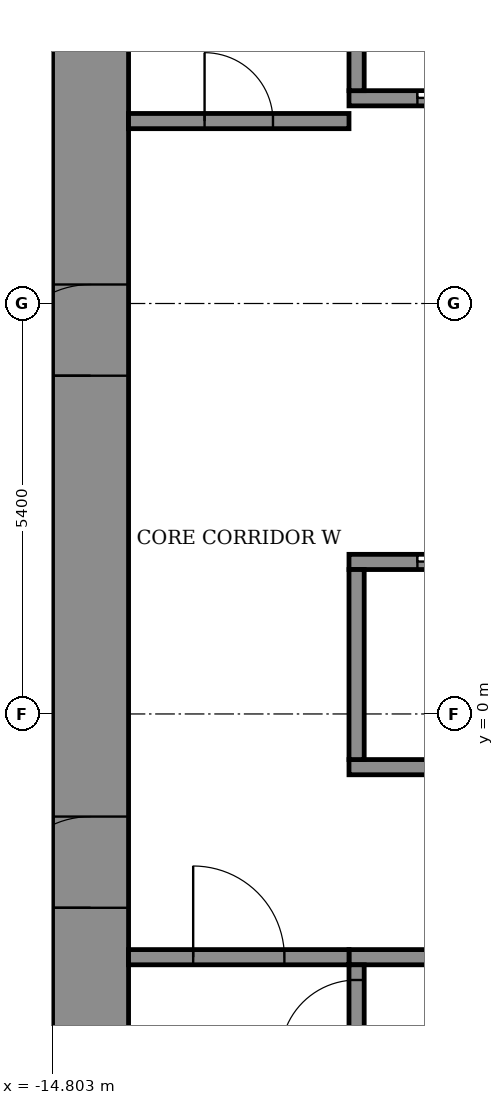
"""IFC4 building model, lengths in metres.
Left out: names, types, materials, properties, quantities, classifications, styles, units other than length and angle.
Written with IfcOpenShell. Run it as: python <this file> out.ifc"""

import sys

from ifc_helpers import new_model, si_unit, direction, frame, frame_2d, origin, place, context, subcontext, project, spatial, rectangle, extrude, element, fill, save


model = new_model("IFC4")
c1 = context("Model", 3, precision=1e-05, world=origin(), true_north=direction((0.0, 1.0)))
c2 = subcontext(c1, "Body", "Model", "MODEL_VIEW")
j1 = project(units=[si_unit("LENGTHUNIT", "METRE"), si_unit("PLANEANGLEUNIT", "RADIAN")], contexts=[c1])
p1 = place(None, origin())
s1 = spatial("IfcSite", under=j1, at=p1, CompositionType="ELEMENT")
p2 = place(p1, origin())
s2 = spatial("IfcBuilding", under=s1, at=p2, CompositionType="ELEMENT")
p3 = place(p2, frame((0.0, 0.0, 119.9)))
s3 = spatial("IfcBuildingStorey", under=s2, at=p3, CompositionType="ELEMENT", Elevation=119.9)
p4 = place(p3, frame((-14.3, -10.8, 0.0), z_axis=(0.0, 0.0, 1.0), x_axis=(0.0, 1.0, 0.0)))
e1 = element("IfcWall", 1, at=p4, inside=s3, PredefinedType="SHEAR", context=c2, shape_type="SweptSolid", body=[
    extrude(rectangle(XDim=21.6, YDim=1.0, at=frame_2d((10.8, 0.0))), origin(), (0.0, 0.0, 1.0), 5.6),
])
p5 = place(p4, frame((8.25, 0.0, 0.0)))
e2 = element("IfcOpeningElement", 2, at=p5, cuts=e1, PredefinedType="OPENING", context=c2, shape_type="SweptSolid", body=[
    extrude(rectangle(XDim=1.2, YDim=2.1, at=frame_2d((0.6, 1.05))), frame((0.0, 0.51, 0.0), z_axis=(0.0, -1.0, 0.0), x_axis=(1.0, 0.0, 0.0)), (0.0, 0.0, 1.0), 1.02),
])
p6 = place(p4, frame((15.25, 0.0, 0.0)))
e3 = element("IfcOpeningElement", 3, at=p6, cuts=e1, PredefinedType="OPENING", context=c2, shape_type="SweptSolid", body=[
    extrude(rectangle(XDim=1.2, YDim=2.1, at=frame_2d((0.6, 1.05))), frame((0.0, 0.51, 0.0), z_axis=(0.0, -1.0, 0.0), x_axis=(1.0, 0.0, 0.0)), (0.0, 0.0, 1.0), 1.02),
])
p7 = place(p4, frame((3.2, 0.0, 0.0)))
e4 = element("IfcOpeningElement", 4, at=p7, cuts=e1, PredefinedType="OPENING", context=c2, shape_type="SweptSolid", body=[
    extrude(rectangle(XDim=1.2, YDim=2.1, at=frame_2d((0.6, 1.05))), frame((0.0, 0.51, 0.0), z_axis=(0.0, -1.0, 0.0), x_axis=(1.0, 0.0, 0.0)), (0.0, 0.0, 1.0), 1.02),
])
p8 = place(p3, frame((-10.9, -3.2, 0.0), z_axis=(0.0, 0.0, 1.0), x_axis=(1.0, 0.0, 0.0)))
e5 = element("IfcWall", 5, at=p8, inside=s3, PredefinedType="SHEAR", context=c2, shape_type="SweptSolid", body=[
    extrude(rectangle(XDim=21.8, YDim=0.2, at=frame_2d((10.9, 0.0))), origin(), (0.0, 0.0, 1.0), 5.05),
])
p9 = place(p8, frame((1.075, 0.0, 0.0)))
e6 = element("IfcOpeningElement", 6, at=p9, cuts=e5, PredefinedType="OPENING", context=c2, shape_type="SweptSolid", body=[
    extrude(rectangle(XDim=1.1, YDim=2.1, at=frame_2d((0.55, 1.05))), frame((0.0, 0.11, 0.0), z_axis=(0.0, -1.0, 0.0), x_axis=(1.0, 0.0, 0.0)), (0.0, 0.0, 1.0), 0.22),
])
p10 = place(p8, frame((10.325, 0.0, 0.0)))
e7 = element("IfcOpeningElement", 7, at=p10, cuts=e5, PredefinedType="OPENING", context=c2, shape_type="SweptSolid", body=[
    extrude(rectangle(XDim=1.1, YDim=2.1, at=frame_2d((0.55, 1.05))), frame((0.0, 0.11, 0.0), z_axis=(0.0, -1.0, 0.0), x_axis=(1.0, 0.0, 0.0)), (0.0, 0.0, 1.0), 0.22),
])
p11 = place(p8, frame((19.625, 0.0, 0.0)))
e8 = element("IfcOpeningElement", 8, at=p11, cuts=e5, PredefinedType="OPENING", context=c2, shape_type="SweptSolid", body=[
    extrude(rectangle(XDim=1.1, YDim=2.1, at=frame_2d((0.55, 1.05))), frame((0.0, 0.11, 0.0), z_axis=(0.0, -1.0, 0.0), x_axis=(1.0, 0.0, 0.0)), (0.0, 0.0, 1.0), 0.22),
])
p12 = place(p8, frame((5.7, 0.0, 0.0)))
e9 = element("IfcOpeningElement", 9, at=p12, cuts=e5, PredefinedType="OPENING", context=c2, shape_type="SweptSolid", body=[
    extrude(rectangle(XDim=1.1, YDim=2.1, at=frame_2d((0.55, 1.05))), frame((0.0, 0.11, 0.0), z_axis=(0.0, -1.0, 0.0), x_axis=(1.0, 0.0, 0.0)), (0.0, 0.0, 1.0), 0.22),
])
p13 = place(p8, frame((14.975, 0.0, 0.0)))
e10 = element("IfcOpeningElement", 10, at=p13, cuts=e5, PredefinedType="OPENING", context=c2, shape_type="SweptSolid", body=[
    extrude(rectangle(XDim=1.1, YDim=2.1, at=frame_2d((0.55, 1.05))), frame((0.0, 0.11, 0.0), z_axis=(0.0, -1.0, 0.0), x_axis=(1.0, 0.0, 0.0)), (0.0, 0.0, 1.0), 0.22),
])
p14 = place(p3, frame((-10.9, -0.7, 0.0), z_axis=(0.0, 0.0, 1.0), x_axis=(1.0, 0.0, 0.0)))
e11 = element("IfcWall", 11, at=p14, inside=s3, PredefinedType="SHEAR", context=c2, shape_type="SweptSolid", body=[
    extrude(rectangle(XDim=21.8, YDim=0.2, at=frame_2d((10.9, 0.0))), origin(), (0.0, 0.0, 1.0), 5.05),
])
p15 = place(p3, frame((-10.9, 2.0, 0.0), z_axis=(0.0, 0.0, 1.0), x_axis=(1.0, 0.0, 0.0)))
e12 = element("IfcWall", 12, at=p15, inside=s3, PredefinedType="SHEAR", context=c2, shape_type="SweptSolid", body=[
    extrude(rectangle(XDim=21.8, YDim=0.2, at=frame_2d((10.9, 0.0))), origin(), (0.0, 0.0, 1.0), 5.05),
])
p16 = place(p15, frame((0.9, 0.0, 0.0)))
e13 = element("IfcOpeningElement", 13, at=p16, cuts=e12, PredefinedType="OPENING", context=c2, shape_type="SweptSolid", body=[
    extrude(rectangle(XDim=1.1, YDim=2.1, at=frame_2d((0.55, 1.05))), frame((0.0, 0.11, 0.0), z_axis=(0.0, -1.0, 0.0), x_axis=(1.0, 0.0, 0.0)), (0.0, 0.0, 1.0), 0.22),
])
p17 = place(p15, frame((3.6, 0.0, 0.0)))
e14 = element("IfcOpeningElement", 14, at=p17, cuts=e12, PredefinedType="OPENING", context=c2, shape_type="SweptSolid", body=[
    extrude(rectangle(XDim=1.1, YDim=2.1, at=frame_2d((0.55, 1.05))), frame((0.0, 0.11, 0.0), z_axis=(0.0, -1.0, 0.0), x_axis=(1.0, 0.0, 0.0)), (0.0, 0.0, 1.0), 0.22),
])
p18 = place(p15, frame((6.3, 0.0, 0.0)))
e15 = element("IfcOpeningElement", 15, at=p18, cuts=e12, PredefinedType="OPENING", context=c2, shape_type="SweptSolid", body=[
    extrude(rectangle(XDim=1.1, YDim=2.1, at=frame_2d((0.55, 1.05))), frame((0.0, 0.11, 0.0), z_axis=(0.0, -1.0, 0.0), x_axis=(1.0, 0.0, 0.0)), (0.0, 0.0, 1.0), 0.22),
])
p19 = place(p15, frame((9.0, 0.0, 0.0)))
e16 = element("IfcOpeningElement", 16, at=p19, cuts=e12, PredefinedType="OPENING", context=c2, shape_type="SweptSolid", body=[
    extrude(rectangle(XDim=1.1, YDim=2.1, at=frame_2d((0.55, 1.05))), frame((0.0, 0.11, 0.0), z_axis=(0.0, -1.0, 0.0), x_axis=(1.0, 0.0, 0.0)), (0.0, 0.0, 1.0), 0.22),
])
p20 = place(p15, frame((11.7, 0.0, 0.0)))
e17 = element("IfcOpeningElement", 17, at=p20, cuts=e12, PredefinedType="OPENING", context=c2, shape_type="SweptSolid", body=[
    extrude(rectangle(XDim=1.1, YDim=2.1, at=frame_2d((0.55, 1.05))), frame((0.0, 0.11, 0.0), z_axis=(0.0, -1.0, 0.0), x_axis=(1.0, 0.0, 0.0)), (0.0, 0.0, 1.0), 0.22),
])
p21 = place(p15, frame((14.4, 0.0, 0.0)))
e18 = element("IfcOpeningElement", 18, at=p21, cuts=e12, PredefinedType="OPENING", context=c2, shape_type="SweptSolid", body=[
    extrude(rectangle(XDim=1.1, YDim=2.1, at=frame_2d((0.55, 1.05))), frame((0.0, 0.11, 0.0), z_axis=(0.0, -1.0, 0.0), x_axis=(1.0, 0.0, 0.0)), (0.0, 0.0, 1.0), 0.22),
])
p22 = place(p15, frame((17.1, 0.0, 0.0)))
e19 = element("IfcOpeningElement", 19, at=p22, cuts=e12, PredefinedType="OPENING", context=c2, shape_type="SweptSolid", body=[
    extrude(rectangle(XDim=1.1, YDim=2.1, at=frame_2d((0.55, 1.05))), frame((0.0, 0.11, 0.0), z_axis=(0.0, -1.0, 0.0), x_axis=(1.0, 0.0, 0.0)), (0.0, 0.0, 1.0), 0.22),
])
p23 = place(p15, frame((19.8, 0.0, 0.0)))
e20 = element("IfcOpeningElement", 20, at=p23, cuts=e12, PredefinedType="OPENING", context=c2, shape_type="SweptSolid", body=[
    extrude(rectangle(XDim=1.1, YDim=2.1, at=frame_2d((0.55, 1.05))), frame((0.0, 0.11, 0.0), z_axis=(0.0, -1.0, 0.0), x_axis=(1.0, 0.0, 0.0)), (0.0, 0.0, 1.0), 0.22),
])
p24 = place(p3, frame((-10.9, 8.1, 0.0), z_axis=(0.0, 0.0, 1.0), x_axis=(1.0, 0.0, 0.0)))
e21 = element("IfcWall", 21, at=p24, inside=s3, PredefinedType="SHEAR", context=c2, shape_type="SweptSolid", body=[
    extrude(rectangle(XDim=21.8, YDim=0.2, at=frame_2d((10.9, 0.0))), origin(), (0.0, 0.0, 1.0), 5.05),
])
p25 = place(p24, frame((0.9, 0.0, 0.0)))
e22 = element("IfcOpeningElement", 22, at=p25, cuts=e21, PredefinedType="OPENING", context=c2, shape_type="SweptSolid", body=[
    extrude(rectangle(XDim=1.1, YDim=2.1, at=frame_2d((0.55, 1.05))), frame((0.0, 0.11, 0.0), z_axis=(0.0, -1.0, 0.0), x_axis=(1.0, 0.0, 0.0)), (0.0, 0.0, 1.0), 0.22),
])
p26 = place(p24, frame((3.6, 0.0, 0.0)))
e23 = element("IfcOpeningElement", 23, at=p26, cuts=e21, PredefinedType="OPENING", context=c2, shape_type="SweptSolid", body=[
    extrude(rectangle(XDim=1.1, YDim=2.1, at=frame_2d((0.55, 1.05))), frame((0.0, 0.11, 0.0), z_axis=(0.0, -1.0, 0.0), x_axis=(1.0, 0.0, 0.0)), (0.0, 0.0, 1.0), 0.22),
])
p27 = place(p24, frame((6.3, 0.0, 0.0)))
e24 = element("IfcOpeningElement", 24, at=p27, cuts=e21, PredefinedType="OPENING", context=c2, shape_type="SweptSolid", body=[
    extrude(rectangle(XDim=1.1, YDim=2.1, at=frame_2d((0.55, 1.05))), frame((0.0, 0.11, 0.0), z_axis=(0.0, -1.0, 0.0), x_axis=(1.0, 0.0, 0.0)), (0.0, 0.0, 1.0), 0.22),
])
p28 = place(p24, frame((9.0, 0.0, 0.0)))
e25 = element("IfcOpeningElement", 25, at=p28, cuts=e21, PredefinedType="OPENING", context=c2, shape_type="SweptSolid", body=[
    extrude(rectangle(XDim=1.1, YDim=2.1, at=frame_2d((0.55, 1.05))), frame((0.0, 0.11, 0.0), z_axis=(0.0, -1.0, 0.0), x_axis=(1.0, 0.0, 0.0)), (0.0, 0.0, 1.0), 0.22),
])
p29 = place(p24, frame((11.7, 0.0, 0.0)))
e26 = element("IfcOpeningElement", 26, at=p29, cuts=e21, PredefinedType="OPENING", context=c2, shape_type="SweptSolid", body=[
    extrude(rectangle(XDim=1.1, YDim=2.1, at=frame_2d((0.55, 1.05))), frame((0.0, 0.11, 0.0), z_axis=(0.0, -1.0, 0.0), x_axis=(1.0, 0.0, 0.0)), (0.0, 0.0, 1.0), 0.22),
])
p30 = place(p24, frame((14.4, 0.0, 0.0)))
e27 = element("IfcOpeningElement", 27, at=p30, cuts=e21, PredefinedType="OPENING", context=c2, shape_type="SweptSolid", body=[
    extrude(rectangle(XDim=1.1, YDim=2.1, at=frame_2d((0.55, 1.05))), frame((0.0, 0.11, 0.0), z_axis=(0.0, -1.0, 0.0), x_axis=(1.0, 0.0, 0.0)), (0.0, 0.0, 1.0), 0.22),
])
p31 = place(p24, frame((17.1, 0.0, 0.0)))
e28 = element("IfcOpeningElement", 28, at=p31, cuts=e21, PredefinedType="OPENING", context=c2, shape_type="SweptSolid", body=[
    extrude(rectangle(XDim=1.1, YDim=2.1, at=frame_2d((0.55, 1.05))), frame((0.0, 0.11, 0.0), z_axis=(0.0, -1.0, 0.0), x_axis=(1.0, 0.0, 0.0)), (0.0, 0.0, 1.0), 0.22),
])
p32 = place(p24, frame((19.8, 0.0, 0.0)))
e29 = element("IfcOpeningElement", 29, at=p32, cuts=e21, PredefinedType="OPENING", context=c2, shape_type="SweptSolid", body=[
    extrude(rectangle(XDim=1.1, YDim=2.1, at=frame_2d((0.55, 1.05))), frame((0.0, 0.11, 0.0), z_axis=(0.0, -1.0, 0.0), x_axis=(1.0, 0.0, 0.0)), (0.0, 0.0, 1.0), 0.22),
])
p33 = place(p3, frame((-10.8, -10.8, 0.0), z_axis=(0.0, 0.0, 1.0), x_axis=(0.0, 1.0, 0.0)))
e30 = element("IfcWall", 30, at=p33, inside=s3, PredefinedType="SHEAR", context=c2, shape_type="SweptSolid", body=[
    extrude(rectangle(XDim=7.5, YDim=0.2, at=frame_2d((3.75, 0.0))), origin(), (0.0, 0.0, 1.0), 5.05),
])
p34 = place(p33, frame((6.3, 0.0, 0.0)))
e31 = element("IfcOpeningElement", 31, at=p34, cuts=e30, PredefinedType="OPENING", context=c2, shape_type="SweptSolid", body=[
    extrude(rectangle(XDim=1.0, YDim=2.1, at=frame_2d((0.5, 1.05))), frame((0.0, 0.11, 0.0), z_axis=(0.0, -1.0, 0.0), x_axis=(1.0, 0.0, 0.0)), (0.0, 0.0, 1.0), 0.22),
])
p35 = place(p3, frame((-10.8, -0.6, 0.0), z_axis=(0.0, 0.0, 1.0), x_axis=(0.0, 1.0, 0.0)))
e32 = element("IfcWall", 32, at=p35, inside=s3, PredefinedType="SHEAR", context=c2, shape_type="SweptSolid", body=[
    extrude(rectangle(XDim=2.5, YDim=0.2, at=frame_2d((1.25, 0.0))), origin(), (0.0, 0.0, 1.0), 5.05),
])
p36 = place(p3, frame((-10.8, 8.2, 0.0), z_axis=(0.0, 0.0, 1.0), x_axis=(0.0, 1.0, 0.0)))
e33 = element("IfcWall", 33, at=p36, inside=s3, PredefinedType="SHEAR", context=c2, shape_type="SweptSolid", body=[
    extrude(rectangle(XDim=2.6, YDim=0.2, at=frame_2d((1.3, 0.0))), origin(), (0.0, 0.0, 1.0), 5.05),
])
p37 = place(p3, frame((-13.8, 7.8, 0.0), z_axis=(0.0, 0.0, 1.0), x_axis=(1.0, 0.0, 0.0)))
e34 = element("IfcWall", 34, at=p37, inside=s3, PredefinedType="STANDARD", context=c2, shape_type="SweptSolid", body=[
    extrude(rectangle(XDim=2.9, YDim=0.2, at=frame_2d((1.45, 0.0))), origin(), (0.0, 0.0, 1.0), 5.05),
])
p38 = place(p37, frame((1.0, 0.0, 0.0)))
e35 = element("IfcOpeningElement", 35, at=p38, cuts=e34, PredefinedType="OPENING", context=c2, shape_type="SweptSolid", body=[
    extrude(rectangle(XDim=0.9, YDim=2.1, at=frame_2d((0.45, 1.05))), frame((0.0, 0.11, 0.0), z_axis=(0.0, -1.0, 0.0), x_axis=(1.0, 0.0, 0.0)), (0.0, 0.0, 1.0), 0.22),
])
p39 = place(p3, frame((-13.8, -3.2, 0.0), z_axis=(0.0, 0.0, 1.0), x_axis=(1.0, 0.0, 0.0)))
e36 = element("IfcWall", 36, at=p39, inside=s3, PredefinedType="STANDARD", context=c2, shape_type="SweptSolid", body=[
    extrude(rectangle(XDim=2.9, YDim=0.2, at=frame_2d((1.45, 0.0))), origin(), (0.0, 0.0, 1.0), 5.05),
])
p40 = place(p39, frame((0.85, 0.0, 0.0)))
e37 = element("IfcOpeningElement", 37, at=p40, cuts=e36, PredefinedType="OPENING", context=c2, shape_type="SweptSolid", body=[
    extrude(rectangle(XDim=1.2, YDim=2.1, at=frame_2d((0.6, 1.05))), frame((0.0, 0.11, 0.0), z_axis=(0.0, -1.0, 0.0), x_axis=(1.0, 0.0, 0.0)), (0.0, 0.0, 1.0), 0.22),
])
p41 = place(p5, origin())
e38 = element("IfcDoor", 38, at=p41, inside=s3, OperationType="DOUBLE_DOOR_SINGLE_SWING", PredefinedType="DOOR", context=c2, shape_type="SweptSolid", body=[
    extrude(rectangle(XDim=1.2, YDim=2.1, at=frame_2d((0.6, 1.05))), frame((0.0, 0.025, 0.0), z_axis=(0.0, -1.0, 0.0), x_axis=(1.0, 0.0, 0.0)), (0.0, 0.0, 1.0), 0.05),
])
fill(e2, e38)
p42 = place(p6, origin())
e39 = element("IfcDoor", 39, at=p42, inside=s3, OperationType="DOUBLE_DOOR_SINGLE_SWING", PredefinedType="DOOR", context=c2, shape_type="SweptSolid", body=[
    extrude(rectangle(XDim=1.2, YDim=2.1, at=frame_2d((0.6, 1.05))), frame((0.0, 0.025, 0.0), z_axis=(0.0, -1.0, 0.0), x_axis=(1.0, 0.0, 0.0)), (0.0, 0.0, 1.0), 0.05),
])
fill(e3, e39)
p43 = place(p16, origin())
e40 = element("IfcDoor", 40, at=p43, inside=s3, OperationType="SLIDING_TO_LEFT", PredefinedType="DOOR", context=c2, shape_type="SweptSolid", body=[
    extrude(rectangle(XDim=1.1, YDim=2.1, at=frame_2d((0.55, 1.05))), frame((0.0, 0.025, 0.0), z_axis=(0.0, -1.0, 0.0), x_axis=(1.0, 0.0, 0.0)), (0.0, 0.0, 1.0), 0.05),
])
fill(e13, e40)
p44 = place(p25, origin())
e41 = element("IfcDoor", 41, at=p44, inside=s3, OperationType="SLIDING_TO_LEFT", PredefinedType="DOOR", context=c2, shape_type="SweptSolid", body=[
    extrude(rectangle(XDim=1.1, YDim=2.1, at=frame_2d((0.55, 1.05))), frame((0.0, 0.025, 0.0), z_axis=(0.0, -1.0, 0.0), x_axis=(1.0, 0.0, 0.0)), (0.0, 0.0, 1.0), 0.05),
])
fill(e22, e41)
p45 = place(p38, origin())
e42 = element("IfcDoor", 42, at=p45, inside=s3, OperationType="SINGLE_SWING_LEFT", PredefinedType="DOOR", context=c2, shape_type="SweptSolid", body=[
    extrude(rectangle(XDim=0.9, YDim=2.1, at=frame_2d((0.45, 1.05))), frame((0.0, 0.025, 0.0), z_axis=(0.0, -1.0, 0.0), x_axis=(1.0, 0.0, 0.0)), (0.0, 0.0, 1.0), 0.05),
])
fill(e35, e42)
p46 = place(p40, origin())
e43 = element("IfcDoor", 43, at=p46, inside=s3, OperationType="SINGLE_SWING_LEFT", PredefinedType="DOOR", context=c2, shape_type="SweptSolid", body=[
    extrude(rectangle(XDim=1.2, YDim=2.1, at=frame_2d((0.6, 1.05))), frame((0.0, 0.025, 0.0), z_axis=(0.0, -1.0, 0.0), x_axis=(1.0, 0.0, 0.0)), (0.0, 0.0, 1.0), 0.05),
])
fill(e37, e43)
p47 = place(p34, origin())
e44 = element("IfcDoor", 44, at=p47, inside=s3, OperationType="SINGLE_SWING_RIGHT", PredefinedType="DOOR", context=c2, shape_type="SweptSolid", body=[
    extrude(rectangle(XDim=1.0, YDim=2.1, at=frame_2d((0.5, 1.05))), frame((0.0, 0.025, 0.0), z_axis=(0.0, -1.0, 0.0), x_axis=(1.0, 0.0, 0.0)), (0.0, 0.0, 1.0), 0.05),
])
fill(e31, e44)
save(model, sys.argv[1])
